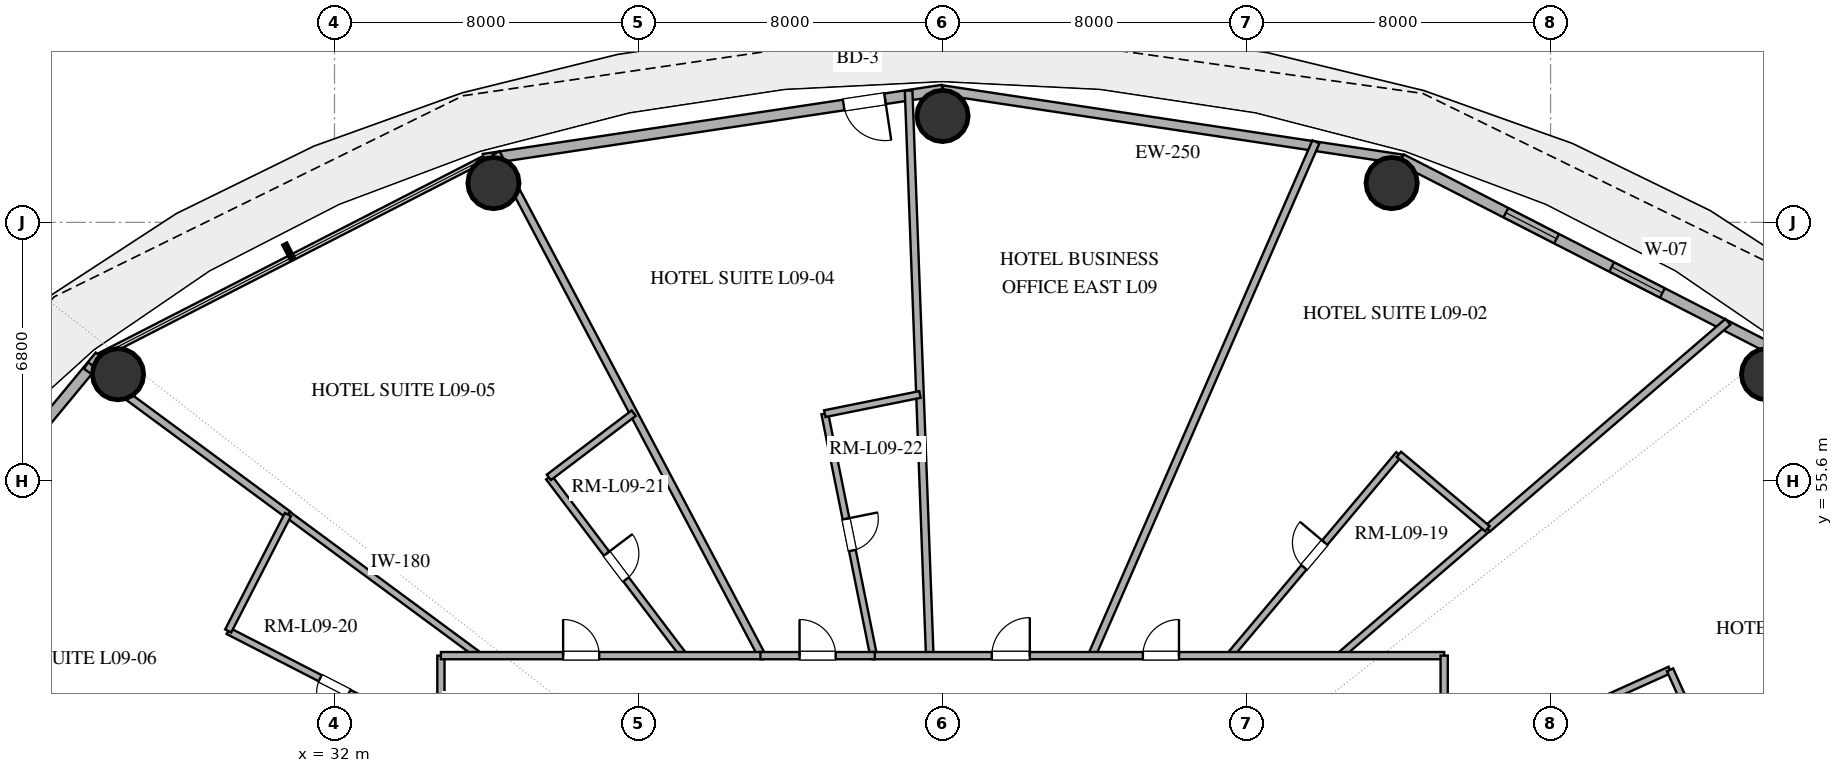
"""IFC4 building model, lengths in metres.
Left out: names, types, materials, properties, quantities, classifications, styles, units other than length and angle.
Written with IfcOpenShell. Run it as: python <this file> out.ifc"""

import sys

from ifc_helpers import new_model, si_unit, direction, frame, frame_2d, origin, origin_2d, place, context, subcontext, project, spatial, rectangle, hollow_circle, extrude, element, fill, save


model = new_model("IFC4")
c1 = context("Model", 3, precision=1e-05, world=origin(), true_north=direction((0.0, 1.0)))
c2 = subcontext(c1, "Body", "Model", "MODEL_VIEW")
j1 = project(units=[si_unit("LENGTHUNIT", "METRE"), si_unit("PLANEANGLEUNIT", "RADIAN")], contexts=[c1])
p1 = place(None, origin())
s1 = spatial("IfcSite", under=j1, at=p1, CompositionType="ELEMENT")
p2 = place(p1, origin())
s2 = spatial("IfcBuilding", under=s1, at=p2, CompositionType="ELEMENT")
p3 = place(p2, frame((0.0, 0.0, 42.6)))
s3 = spatial("IfcBuildingStorey", under=s2, at=p3, CompositionType="ELEMENT", Elevation=42.6)
for number, where, z_axis, x_axis in (
    (1, (69.697, 58.405, 0.0), (0.0, 0.0, 1.0), (1.0, 0.0, 0.0)),
    (2, (59.818, 63.434, 0.0), (0.0, 0.0, 1.0), (1.0, 0.0, 0.0)),
    (3, (48.0, 65.2, 0.0), (0.0, 0.0, 1.0), (1.0, 0.0, 0.0)),
    (4, (36.182, 63.434, 0.0), (0.0, 0.0, 1.0), (1.0, 0.0, 0.0)),
    (5, (26.303, 58.405, 0.0), (0.0, 0.0, 1.0), (1.0, 0.0, 0.0)),
):
    element("IfcColumn", number, at=place(p3, frame(where, z_axis=z_axis, x_axis=x_axis)), inside=s3, PredefinedType="COLUMN", context=c2, shape_type="SweptSolid", body=[
        extrude(hollow_circle(Radius=0.675, WallThickness=0.036, at=origin_2d()), origin(), (0.0, 0.0, 1.0), 3.38),
    ])
p4 = place(p3, frame((70.174, 58.886, 0.0), z_axis=(0.0, 0.0, 1.0), x_axis=(-0.889853976658, 0.456245438581, 0.0)))
e6 = element("IfcWall", 6, at=p4, inside=s3, PredefinedType="SOLIDWALL", context=c2, shape_type="SweptSolid", body=[
    extrude(rectangle(XDim=11.346, YDim=0.28, at=frame_2d((5.673, 0.0))), origin(), (0.0, 0.0, 1.0), 3.38),
])
p5 = place(p4, frame((3.632, 0.0, 0.85)))
e7 = element("IfcOpeningElement", 7, at=p5, cuts=e6, PredefinedType="OPENING", context=c2, shape_type="SweptSolid", body=[
    extrude(rectangle(XDim=1.5, YDim=1.8, at=frame_2d((0.75, 0.9))), frame((0.0, 0.15, 0.0), z_axis=(0.0, -1.0, 0.0), x_axis=(1.0, 0.0, 0.0)), (0.0, 0.0, 1.0), 0.3),
])
p6 = place(p4, frame((6.761, 0.0, 0.85)))
e8 = element("IfcOpeningElement", 8, at=p6, cuts=e6, PredefinedType="OPENING", context=c2, shape_type="SweptSolid", body=[
    extrude(rectangle(XDim=1.5, YDim=1.8, at=frame_2d((0.75, 0.9))), frame((0.0, 0.15, 0.0), z_axis=(0.0, -1.0, 0.0), x_axis=(1.0, 0.0, 0.0)), (0.0, 0.0, 1.0), 0.3),
])
p7 = place(p3, frame((60.078, 64.062, 0.0), z_axis=(0.0, 0.0, 1.0), x_axis=(-0.988864835849, 0.148816452121, 0.0)))
e9 = element("IfcWall", 9, at=p7, inside=s3, PredefinedType="SOLIDWALL", context=c2, shape_type="SweptSolid", body=[
    extrude(rectangle(XDim=12.214, YDim=0.25, at=frame_2d((6.107, 0.0))), origin(), (0.0, 0.0, 1.0), 3.38),
])
p8 = place(p3, frame((48.0, 65.88, 0.0), z_axis=(0.0, 0.0, 1.0), x_axis=(-0.988864835849, -0.148816452121, 0.0)))
e10 = element("IfcWall", 10, at=p8, inside=s3, PredefinedType="SOLIDWALL", context=c2, shape_type="SweptSolid", body=[
    extrude(rectangle(XDim=12.214, YDim=0.28, at=frame_2d((6.107, 0.0))), origin(), (0.0, 0.0, 1.0), 3.38),
])
p9 = place(p8, frame((1.531, 0.0, 0.0)))
e11 = element("IfcOpeningElement", 11, at=p9, cuts=e10, PredefinedType="OPENING", context=c2, shape_type="SweptSolid", body=[
    extrude(rectangle(XDim=1.1, YDim=2.25, at=frame_2d((0.55, 1.125))), frame((0.0, 0.15, 0.0), z_axis=(0.0, -1.0, 0.0), x_axis=(1.0, 0.0, 0.0)), (0.0, 0.0, 1.0), 0.3),
])
p10 = place(p3, frame((25.826, 58.886, 0.0), z_axis=(0.0, 0.0, 1.0), x_axis=(-0.637296809613, -0.770618437657, 0.0)))
e12 = element("IfcWall", 12, at=p10, inside=s3, PredefinedType="SOLIDWALL", context=c2, shape_type="SweptSolid", body=[
    extrude(rectangle(XDim=10.053, YDim=0.28, at=frame_2d((5.027, 0.0))), origin(), (0.0, 0.0, 1.0), 3.38),
])
p11 = place(p10, frame((2.398, 0.0, 0.85)))
e13 = element("IfcOpeningElement", 13, at=p11, cuts=e12, PredefinedType="OPENING", context=c2, shape_type="SweptSolid", body=[
    extrude(rectangle(XDim=2.1, YDim=2.2, at=frame_2d((1.05, 1.1))), frame((0.0, 0.15, 0.0), z_axis=(0.0, -1.0, 0.0), x_axis=(1.0, 0.0, 0.0)), (0.0, 0.0, 1.0), 0.3),
])
p12 = place(p10, frame((5.43, 0.0, 0.85)))
e14 = element("IfcOpeningElement", 14, at=p12, cuts=e12, PredefinedType="OPENING", context=c2, shape_type="SweptSolid", body=[
    extrude(rectangle(XDim=2.1, YDim=2.2, at=frame_2d((1.05, 1.1))), frame((0.0, 0.15, 0.0), z_axis=(0.0, -1.0, 0.0), x_axis=(1.0, 0.0, 0.0)), (0.0, 0.0, 1.0), 0.3),
])
p13 = place(p3, frame((57.825, 64.519, 0.0), z_axis=(0.0, 0.0, 1.0), x_axis=(-0.399884283786, -0.916565632991, 0.0)))
e15 = element("IfcWall", 15, at=p13, inside=s3, PredefinedType="PARTITIONING", context=c2, shape_type="SweptSolid", body=[
    extrude(rectangle(XDim=14.749, YDim=0.2, at=frame_2d((7.375, 0.0))), origin(), (0.0, 0.0, 1.0), 2.74),
])
p14 = place(p3, frame((68.666, 59.784, 0.0), z_axis=(0.0, 0.0, 1.0), x_axis=(-0.757966817992, -0.652293111127, 0.0)))
e16 = element("IfcWall", 16, at=p14, inside=s3, PredefinedType="PARTITIONING", context=c2, shape_type="SweptSolid", body=[
    extrude(rectangle(XDim=8.347, YDim=0.2, at=frame_2d((4.174, 0.0))), origin(), (0.0, 0.0, 1.0), 2.74),
])
p15 = place(p3, frame((47.663, 51.0, 0.0), z_axis=(0.0, 0.0, 1.0), x_axis=(-0.037384345878, 0.999300961014, 0.0)))
e17 = element("IfcWall", 17, at=p15, inside=s3, PredefinedType="PARTITIONING", context=c2, shape_type="SweptSolid", body=[
    extrude(rectangle(XDim=14.877, YDim=0.2, at=frame_2d((7.438, 0.0))), origin(), (0.0, 0.0, 1.0), 2.74),
])
p16 = place(p3, frame((43.243, 51.0, 0.0), z_axis=(0.0, 0.0, 1.0), x_axis=(-0.467270516294, 0.884114395654, 0.0)))
e18 = element("IfcWall", 18, at=p16, inside=s3, PredefinedType="PARTITIONING", context=c2, shape_type="SweptSolid", body=[
    extrude(rectangle(XDim=14.96, YDim=0.2, at=frame_2d((7.48, 0.0))), origin(), (0.0, 0.0, 1.0), 2.74),
])
p17 = place(p3, frame((55.56, 51.0, 0.0), z_axis=(0.0, 0.0, 1.0), x_axis=(0.643154836645, 0.765736153058, 0.0)))
e19 = element("IfcWall", 19, at=p17, inside=s3, PredefinedType="PLUMBINGWALL", context=c2, shape_type="SweptSolid", body=[
    extrude(rectangle(XDim=6.917, YDim=0.18, at=frame_2d((3.458, 0.0))), origin(), (0.0, 0.0, 1.0), 2.74),
])
p18 = place(p17, frame((3.034, 0.0, 0.0)))
e20 = element("IfcOpeningElement", 20, at=p18, cuts=e19, PredefinedType="OPENING", context=c2, shape_type="SweptSolid", body=[
    extrude(rectangle(XDim=0.85, YDim=2.1, at=frame_2d((0.425, 1.05))), frame((0.0, 0.1, 0.0), z_axis=(0.0, -1.0, 0.0), x_axis=(1.0, 0.0, 0.0)), (0.0, 0.0, 1.0), 0.2),
])
p19 = place(p3, frame((25.462, 58.634, 0.0), z_axis=(0.0, 0.0, 1.0), x_axis=(0.804616980297, -0.593794168898, 0.0)))
e21 = element("IfcWall", 21, at=p19, inside=s3, PredefinedType="PARTITIONING", context=c2, shape_type="SweptSolid", body=[
    extrude(rectangle(XDim=6.603, YDim=0.2, at=frame_2d((3.302, 0.0))), origin(), (0.0, 0.0, 1.0), 2.74),
])
p20 = place(p3, frame((67.143, 50.626, 0.0), z_axis=(0.0, 0.0, 1.0), x_axis=(-0.911702033518, -0.410852044025, 0.0)))
e22 = element("IfcWall", 22, at=p20, inside=s3, PredefinedType="PLUMBINGWALL", context=c2, shape_type="SweptSolid", body=[
    extrude(rectangle(XDim=6.519, YDim=0.18, at=frame_2d((3.259, 0.0))), origin(), (0.0, 0.0, 1.0), 2.74),
])
p21 = place(p20, frame((2.834, 0.0, 0.0)))
e23 = element("IfcOpeningElement", 23, at=p21, cuts=e22, PredefinedType="OPENING", context=c2, shape_type="SweptSolid", body=[
    extrude(rectangle(XDim=0.85, YDim=2.1, at=frame_2d((0.425, 1.05))), frame((0.0, 0.1, 0.0), z_axis=(0.0, -1.0, 0.0), x_axis=(1.0, 0.0, 0.0)), (0.0, 0.0, 1.0), 0.2),
])
p22 = place(p3, frame((44.902, 57.367, 0.0), z_axis=(0.0, 0.0, 1.0), x_axis=(0.197648412503, -0.980272974755, 0.0)))
e24 = element("IfcWall", 24, at=p22, inside=s3, PredefinedType="PLUMBINGWALL", context=c2, shape_type="SweptSolid", body=[
    extrude(rectangle(XDim=6.495, YDim=0.18, at=frame_2d((3.248, 0.0))), origin(), (0.0, 0.0, 1.0), 2.74),
])
p23 = place(p22, frame((2.823, 0.0, 0.0)))
e25 = element("IfcOpeningElement", 25, at=p23, cuts=e24, PredefinedType="OPENING", context=c2, shape_type="SweptSolid", body=[
    extrude(rectangle(XDim=0.85, YDim=2.1, at=frame_2d((0.425, 1.05))), frame((0.0, 0.1, 0.0), z_axis=(0.0, -1.0, 0.0), x_axis=(1.0, 0.0, 0.0)), (0.0, 0.0, 1.0), 0.2),
])
p24 = place(p3, frame((34.8, 48.776, 0.0), z_axis=(0.0, 0.0, 1.0), x_axis=(-0.889651376734, 0.456640370395, 0.0)))
e26 = element("IfcWall", 26, at=p24, inside=s3, PredefinedType="PLUMBINGWALL", context=c2, shape_type="SweptSolid", body=[
    extrude(rectangle(XDim=6.292, YDim=0.18, at=frame_2d((3.146, 0.0))), origin(), (0.0, 0.0, 1.0), 2.74),
])
p25 = place(p24, frame((2.721, 0.0, 0.0)))
e27 = element("IfcOpeningElement", 27, at=p25, cuts=e26, PredefinedType="OPENING", context=c2, shape_type="SweptSolid", body=[
    extrude(rectangle(XDim=0.85, YDim=2.1, at=frame_2d((0.425, 1.05))), frame((0.0, 0.1, 0.0), z_axis=(0.0, -1.0, 0.0), x_axis=(1.0, 0.0, 0.0)), (0.0, 0.0, 1.0), 0.2),
])
p26 = place(p3, frame((30.775, 54.713, 0.0), z_axis=(0.0, 0.0, 1.0), x_axis=(0.804582519588, -0.593840861825, 0.0)))
e28 = element("IfcWall", 28, at=p26, inside=s3, PredefinedType="PLUMBINGWALL", context=c2, shape_type="SweptSolid", body=[
    extrude(rectangle(XDim=6.252, YDim=0.18, at=frame_2d((3.126, 0.0))), origin(), (0.0, 0.0, 1.0), 2.74),
])
p27 = place(p3, frame((34.8, 36.017, 0.0), z_axis=(0.0, 0.0, 1.0), x_axis=(0.0, 1.0, 0.0)))
e29 = element("IfcWall", 29, at=p27, inside=s3, PredefinedType="PARTITIONING", context=c2, shape_type="SweptSolid", body=[
    extrude(rectangle(XDim=14.983, YDim=0.19, at=frame_2d((7.492, 0.0))), origin(), (0.0, 0.0, 1.0), 2.74),
])
p28 = place(p27, frame((4.963, 0.0, 0.0)))
e30 = element("IfcOpeningElement", 30, at=p28, cuts=e29, PredefinedType="OPENING", context=c2, shape_type="SweptSolid", body=[
    extrude(rectangle(XDim=1.0, YDim=2.2, at=frame_2d((0.5, 1.1))), frame((0.0, 0.105, 0.0), z_axis=(0.0, -1.0, 0.0), x_axis=(1.0, 0.0, 0.0)), (0.0, 0.0, 1.0), 0.21),
])
p29 = place(p27, frame((10.146, 0.0, 0.0)))
e31 = element("IfcOpeningElement", 31, at=p29, cuts=e29, PredefinedType="OPENING", context=c2, shape_type="SweptSolid", body=[
    extrude(rectangle(XDim=0.95, YDim=2.15, at=frame_2d((0.475, 1.075))), frame((0.0, 0.105, 0.0), z_axis=(0.0, -1.0, 0.0), x_axis=(1.0, 0.0, 0.0)), (0.0, 0.0, 1.0), 0.21),
])
p30 = place(p3, frame((37.64, 55.691, 0.0), z_axis=(0.0, 0.0, 1.0), x_axis=(0.603401299207, -0.797437691682, 0.0)))
e32 = element("IfcWall", 32, at=p30, inside=s3, PredefinedType="PLUMBINGWALL", context=c2, shape_type="SweptSolid", body=[
    extrude(rectangle(XDim=5.882, YDim=0.18, at=frame_2d((2.941, 0.0))), origin(), (0.0, 0.0, 1.0), 2.74),
])
p31 = place(p30, frame((2.516, 0.0, 0.0)))
e33 = element("IfcOpeningElement", 33, at=p31, cuts=e32, PredefinedType="OPENING", context=c2, shape_type="SweptSolid", body=[
    extrude(rectangle(XDim=0.85, YDim=2.1, at=frame_2d((0.425, 1.05))), frame((0.0, 0.1, 0.0), z_axis=(0.0, -1.0, 0.0), x_axis=(1.0, 0.0, 0.0)), (0.0, 0.0, 1.0), 0.2),
])
p32 = place(p3, frame((34.8, 51.0, 0.0), z_axis=(0.0, 0.0, 1.0), x_axis=(1.0, 0.0, 0.0)))
e34 = element("IfcWall", 34, at=p32, inside=s3, PredefinedType="PARTITIONING", context=c2, shape_type="SweptSolid", body=[
    extrude(rectangle(XDim=8.479, YDim=0.19, at=frame_2d((4.24, 0.0))), origin(), (0.0, 0.0, 1.0), 2.74),
])
p33 = place(p32, frame((3.216, 0.0, 0.0)))
e35 = element("IfcOpeningElement", 35, at=p33, cuts=e34, PredefinedType="OPENING", context=c2, shape_type="SweptSolid", body=[
    extrude(rectangle(XDim=0.95, YDim=2.15, at=frame_2d((0.475, 1.075))), frame((0.0, 0.105, 0.0), z_axis=(0.0, -1.0, 0.0), x_axis=(1.0, 0.0, 0.0)), (0.0, 0.0, 1.0), 0.21),
])
p34 = place(p3, frame((62.339, 54.339, 0.0), z_axis=(0.0, 0.0, 1.0), x_axis=(-0.757969199921, -0.652290343307, 0.0)))
e36 = element("IfcWall", 36, at=p34, inside=s3, PredefinedType="PLUMBINGWALL", context=c2, shape_type="SweptSolid", body=[
    extrude(rectangle(XDim=5.119, YDim=0.18, at=frame_2d((2.56, 0.0))), origin(), (0.0, 0.0, 1.0), 2.74),
])
p35 = place(p3, frame((46.153, 51.0, 0.0), z_axis=(0.0, 0.0, 1.0), x_axis=(1.0, 0.0, 0.0)))
e37 = element("IfcWall", 37, at=p35, inside=s3, PredefinedType="PARTITIONING", context=c2, shape_type="SweptSolid", body=[
    extrude(rectangle(XDim=15.047, YDim=0.19, at=frame_2d((7.524, 0.0))), origin(), (0.0, 0.0, 1.0), 2.74),
])
p36 = place(p35, frame((3.144, 0.0, 0.0)))
e38 = element("IfcOpeningElement", 38, at=p36, cuts=e37, PredefinedType="OPENING", context=c2, shape_type="SweptSolid", body=[
    extrude(rectangle(XDim=1.0, YDim=2.2, at=frame_2d((0.5, 1.1))), frame((0.0, 0.105, 0.0), z_axis=(0.0, -1.0, 0.0), x_axis=(1.0, 0.0, 0.0)), (0.0, 0.0, 1.0), 0.21),
])
p37 = place(p35, frame((7.119, 0.0, 0.0)))
e39 = element("IfcOpeningElement", 39, at=p37, cuts=e37, PredefinedType="OPENING", context=c2, shape_type="SweptSolid", body=[
    extrude(rectangle(XDim=0.95, YDim=2.15, at=frame_2d((0.475, 1.075))), frame((0.0, 0.105, 0.0), z_axis=(0.0, -1.0, 0.0), x_axis=(1.0, 0.0, 0.0)), (0.0, 0.0, 1.0), 0.21),
])
p38 = place(p3, frame((29.202, 51.649, 0.0), z_axis=(0.0, 0.0, 1.0), x_axis=(0.456659133546, 0.889641745732, 0.0)))
e40 = element("IfcWall", 40, at=p38, inside=s3, PredefinedType="PLUMBINGWALL", context=c2, shape_type="SweptSolid", body=[
    extrude(rectangle(XDim=3.444, YDim=0.18, at=frame_2d((1.722, 0.0))), origin(), (0.0, 0.0, 1.0), 2.74),
])
p39 = place(p3, frame((68.549, 47.506, 0.0), z_axis=(0.0, 0.0, 1.0), x_axis=(-0.410839223928, 0.911707810695, 0.0)))
e41 = element("IfcWall", 41, at=p39, inside=s3, PredefinedType="PLUMBINGWALL", context=c2, shape_type="SweptSolid", body=[
    extrude(rectangle(XDim=3.422, YDim=0.18, at=frame_2d((1.711, 0.0))), origin(), (0.0, 0.0, 1.0), 2.74),
])
p40 = place(p3, frame((61.2, 51.0, 0.0), z_axis=(0.0, 0.0, 1.0), x_axis=(0.0, -1.0, 0.0)))
e42 = element("IfcWall", 42, at=p40, inside=s3, PredefinedType="PARTITIONING", context=c2, shape_type="SweptSolid", body=[
    extrude(rectangle(XDim=3.087, YDim=0.19, at=frame_2d((1.543, 0.0))), origin(), (0.0, 0.0, 1.0), 2.74),
])
p41 = place(p40, frame((1.069, 0.0, 0.0)))
e43 = element("IfcOpeningElement", 43, at=p41, cuts=e42, PredefinedType="OPENING", context=c2, shape_type="SweptSolid", body=[
    extrude(rectangle(XDim=0.95, YDim=2.15, at=frame_2d((0.475, 1.075))), frame((0.0, 0.105, 0.0), z_axis=(0.0, -1.0, 0.0), x_axis=(1.0, 0.0, 0.0)), (0.0, 0.0, 1.0), 0.21),
])
p42 = place(p3, frame((60.008, 56.297, 0.0), z_axis=(0.0, 0.0, 1.0), x_axis=(0.765736471754, -0.643154457208, 0.0)))
e44 = element("IfcWall", 44, at=p42, inside=s3, PredefinedType="PLUMBINGWALL", context=c2, shape_type="SweptSolid", body=[
    extrude(rectangle(XDim=3.043, YDim=0.18, at=frame_2d((1.521, 0.0))), origin(), (0.0, 0.0, 1.0), 2.74),
])
p43 = place(p3, frame((43.207, 51.0, 0.0), z_axis=(0.0, 0.0, 1.0), x_axis=(1.0, 0.0, 0.0)))
e45 = element("IfcWall", 45, at=p43, inside=s3, PredefinedType="PARTITIONING", context=c2, shape_type="SweptSolid", body=[
    extrude(rectangle(XDim=3.011, YDim=0.19, at=frame_2d((1.505, 0.0))), origin(), (0.0, 0.0, 1.0), 2.74),
])
p44 = place(p43, frame((1.03, 0.0, 0.0)))
e46 = element("IfcOpeningElement", 46, at=p44, cuts=e45, PredefinedType="OPENING", context=c2, shape_type="SweptSolid", body=[
    extrude(rectangle(XDim=0.95, YDim=2.15, at=frame_2d((0.475, 1.075))), frame((0.0, 0.105, 0.0), z_axis=(0.0, -1.0, 0.0), x_axis=(1.0, 0.0, 0.0)), (0.0, 0.0, 1.0), 0.21),
])
p45 = place(p3, frame((39.872, 57.379, 0.0), z_axis=(0.0, 0.0, 1.0), x_axis=(-0.797438154909, -0.603400687019, 0.0)))
e47 = element("IfcWall", 47, at=p45, inside=s3, PredefinedType="PLUMBINGWALL", context=c2, shape_type="SweptSolid", body=[
    extrude(rectangle(XDim=2.798, YDim=0.18, at=frame_2d((1.399, 0.0))), origin(), (0.0, 0.0, 1.0), 2.74),
])
p46 = place(p3, frame((47.406, 57.872, 0.0), z_axis=(0.0, 0.0, 1.0), x_axis=(-0.980278128955, -0.1976228476, 0.0)))
e48 = element("IfcWall", 48, at=p46, inside=s3, PredefinedType="PLUMBINGWALL", context=c2, shape_type="SweptSolid", body=[
    extrude(rectangle(XDim=2.555, YDim=0.18, at=frame_2d((1.277, 0.0))), origin(), (0.0, 0.0, 1.0), 2.74),
])
p47 = place(p5, origin())
e49 = element("IfcWindow", 49, at=p47, inside=s3, PartitioningType="SINGLE_PANEL", PredefinedType="WINDOW", context=c2, shape_type="SweptSolid", body=[
    extrude(rectangle(XDim=1.5, YDim=1.8, at=frame_2d((0.75, 0.9))), frame((0.0, 0.03, 0.0), z_axis=(0.0, -1.0, 0.0), x_axis=(1.0, 0.0, 0.0)), (0.0, 0.0, 1.0), 0.06),
])
fill(e7, e49)
p48 = place(p6, origin())
e50 = element("IfcWindow", 50, at=p48, inside=s3, PartitioningType="SINGLE_PANEL", PredefinedType="WINDOW", context=c2, shape_type="SweptSolid", body=[
    extrude(rectangle(XDim=1.5, YDim=1.8, at=frame_2d((0.75, 0.9))), frame((0.0, 0.03, 0.0), z_axis=(0.0, -1.0, 0.0), x_axis=(1.0, 0.0, 0.0)), (0.0, 0.0, 1.0), 0.06),
])
fill(e8, e50)
p49 = place(p9, origin())
e51 = element("IfcDoor", 51, at=p49, inside=s3, OperationType="SINGLE_SWING_LEFT", PredefinedType="DOOR", context=c2, shape_type="SweptSolid", body=[
    extrude(rectangle(XDim=1.1, YDim=2.25, at=frame_2d((0.55, 1.125))), frame((0.0, 0.025, 0.0), z_axis=(0.0, -1.0, 0.0), x_axis=(1.0, 0.0, 0.0)), (0.0, 0.0, 1.0), 0.05),
])
fill(e11, e51)
p50 = place(p18, origin())
e52 = element("IfcDoor", 52, at=p50, inside=s3, OperationType="SINGLE_SWING_RIGHT", PredefinedType="DOOR", context=c2, shape_type="SweptSolid", body=[
    extrude(rectangle(XDim=0.85, YDim=2.1, at=frame_2d((0.425, 1.05))), frame((0.0, 0.025, 0.0), z_axis=(0.0, -1.0, 0.0), x_axis=(1.0, 0.0, 0.0)), (0.0, 0.0, 1.0), 0.05),
])
fill(e20, e52)
p51 = place(p23, origin())
e53 = element("IfcDoor", 53, at=p51, inside=s3, OperationType="SINGLE_SWING_LEFT", PredefinedType="DOOR", context=c2, shape_type="SweptSolid", body=[
    extrude(rectangle(XDim=0.85, YDim=2.1, at=frame_2d((0.425, 1.05))), frame((0.0, 0.025, 0.0), z_axis=(0.0, -1.0, 0.0), x_axis=(1.0, 0.0, 0.0)), (0.0, 0.0, 1.0), 0.05),
])
fill(e25, e53)
p52 = place(p25, origin())
e54 = element("IfcDoor", 54, at=p52, inside=s3, OperationType="SINGLE_SWING_LEFT", PredefinedType="DOOR", context=c2, shape_type="SweptSolid", body=[
    extrude(rectangle(XDim=0.85, YDim=2.1, at=frame_2d((0.425, 1.05))), frame((0.0, 0.025, 0.0), z_axis=(0.0, -1.0, 0.0), x_axis=(1.0, 0.0, 0.0)), (0.0, 0.0, 1.0), 0.05),
])
fill(e27, e54)
p53 = place(p31, origin())
e55 = element("IfcDoor", 55, at=p53, inside=s3, OperationType="SINGLE_SWING_LEFT", PredefinedType="DOOR", context=c2, shape_type="SweptSolid", body=[
    extrude(rectangle(XDim=0.85, YDim=2.1, at=frame_2d((0.425, 1.05))), frame((0.0, 0.025, 0.0), z_axis=(0.0, -1.0, 0.0), x_axis=(1.0, 0.0, 0.0)), (0.0, 0.0, 1.0), 0.05),
])
fill(e33, e55)
p54 = place(p33, origin())
e56 = element("IfcDoor", 56, at=p54, inside=s3, OperationType="SINGLE_SWING_LEFT", PredefinedType="DOOR", context=c2, shape_type="SweptSolid", body=[
    extrude(rectangle(XDim=0.95, YDim=2.15, at=frame_2d((0.475, 1.075))), frame((0.0, 0.025, 0.0), z_axis=(0.0, -1.0, 0.0), x_axis=(1.0, 0.0, 0.0)), (0.0, 0.0, 1.0), 0.05),
])
fill(e35, e56)
p55 = place(p36, origin())
e57 = element("IfcDoor", 57, at=p55, inside=s3, OperationType="SINGLE_SWING_RIGHT", PredefinedType="DOOR", context=c2, shape_type="SweptSolid", body=[
    extrude(rectangle(XDim=1.0, YDim=2.2, at=frame_2d((0.5, 1.1))), frame((0.0, 0.025, 0.0), z_axis=(0.0, -1.0, 0.0), x_axis=(1.0, 0.0, 0.0)), (0.0, 0.0, 1.0), 0.05),
])
fill(e38, e57)
p56 = place(p37, origin())
e58 = element("IfcDoor", 58, at=p56, inside=s3, OperationType="SINGLE_SWING_RIGHT", PredefinedType="DOOR", context=c2, shape_type="SweptSolid", body=[
    extrude(rectangle(XDim=0.95, YDim=2.15, at=frame_2d((0.475, 1.075))), frame((0.0, 0.025, 0.0), z_axis=(0.0, -1.0, 0.0), x_axis=(1.0, 0.0, 0.0)), (0.0, 0.0, 1.0), 0.05),
])
fill(e39, e58)
p57 = place(p44, origin())
e59 = element("IfcDoor", 59, at=p57, inside=s3, OperationType="SINGLE_SWING_LEFT", PredefinedType="DOOR", context=c2, shape_type="SweptSolid", body=[
    extrude(rectangle(XDim=0.95, YDim=2.15, at=frame_2d((0.475, 1.075))), frame((0.0, 0.025, 0.0), z_axis=(0.0, -1.0, 0.0), x_axis=(1.0, 0.0, 0.0)), (0.0, 0.0, 1.0), 0.05),
])
fill(e46, e59)
save(model, sys.argv[1])
